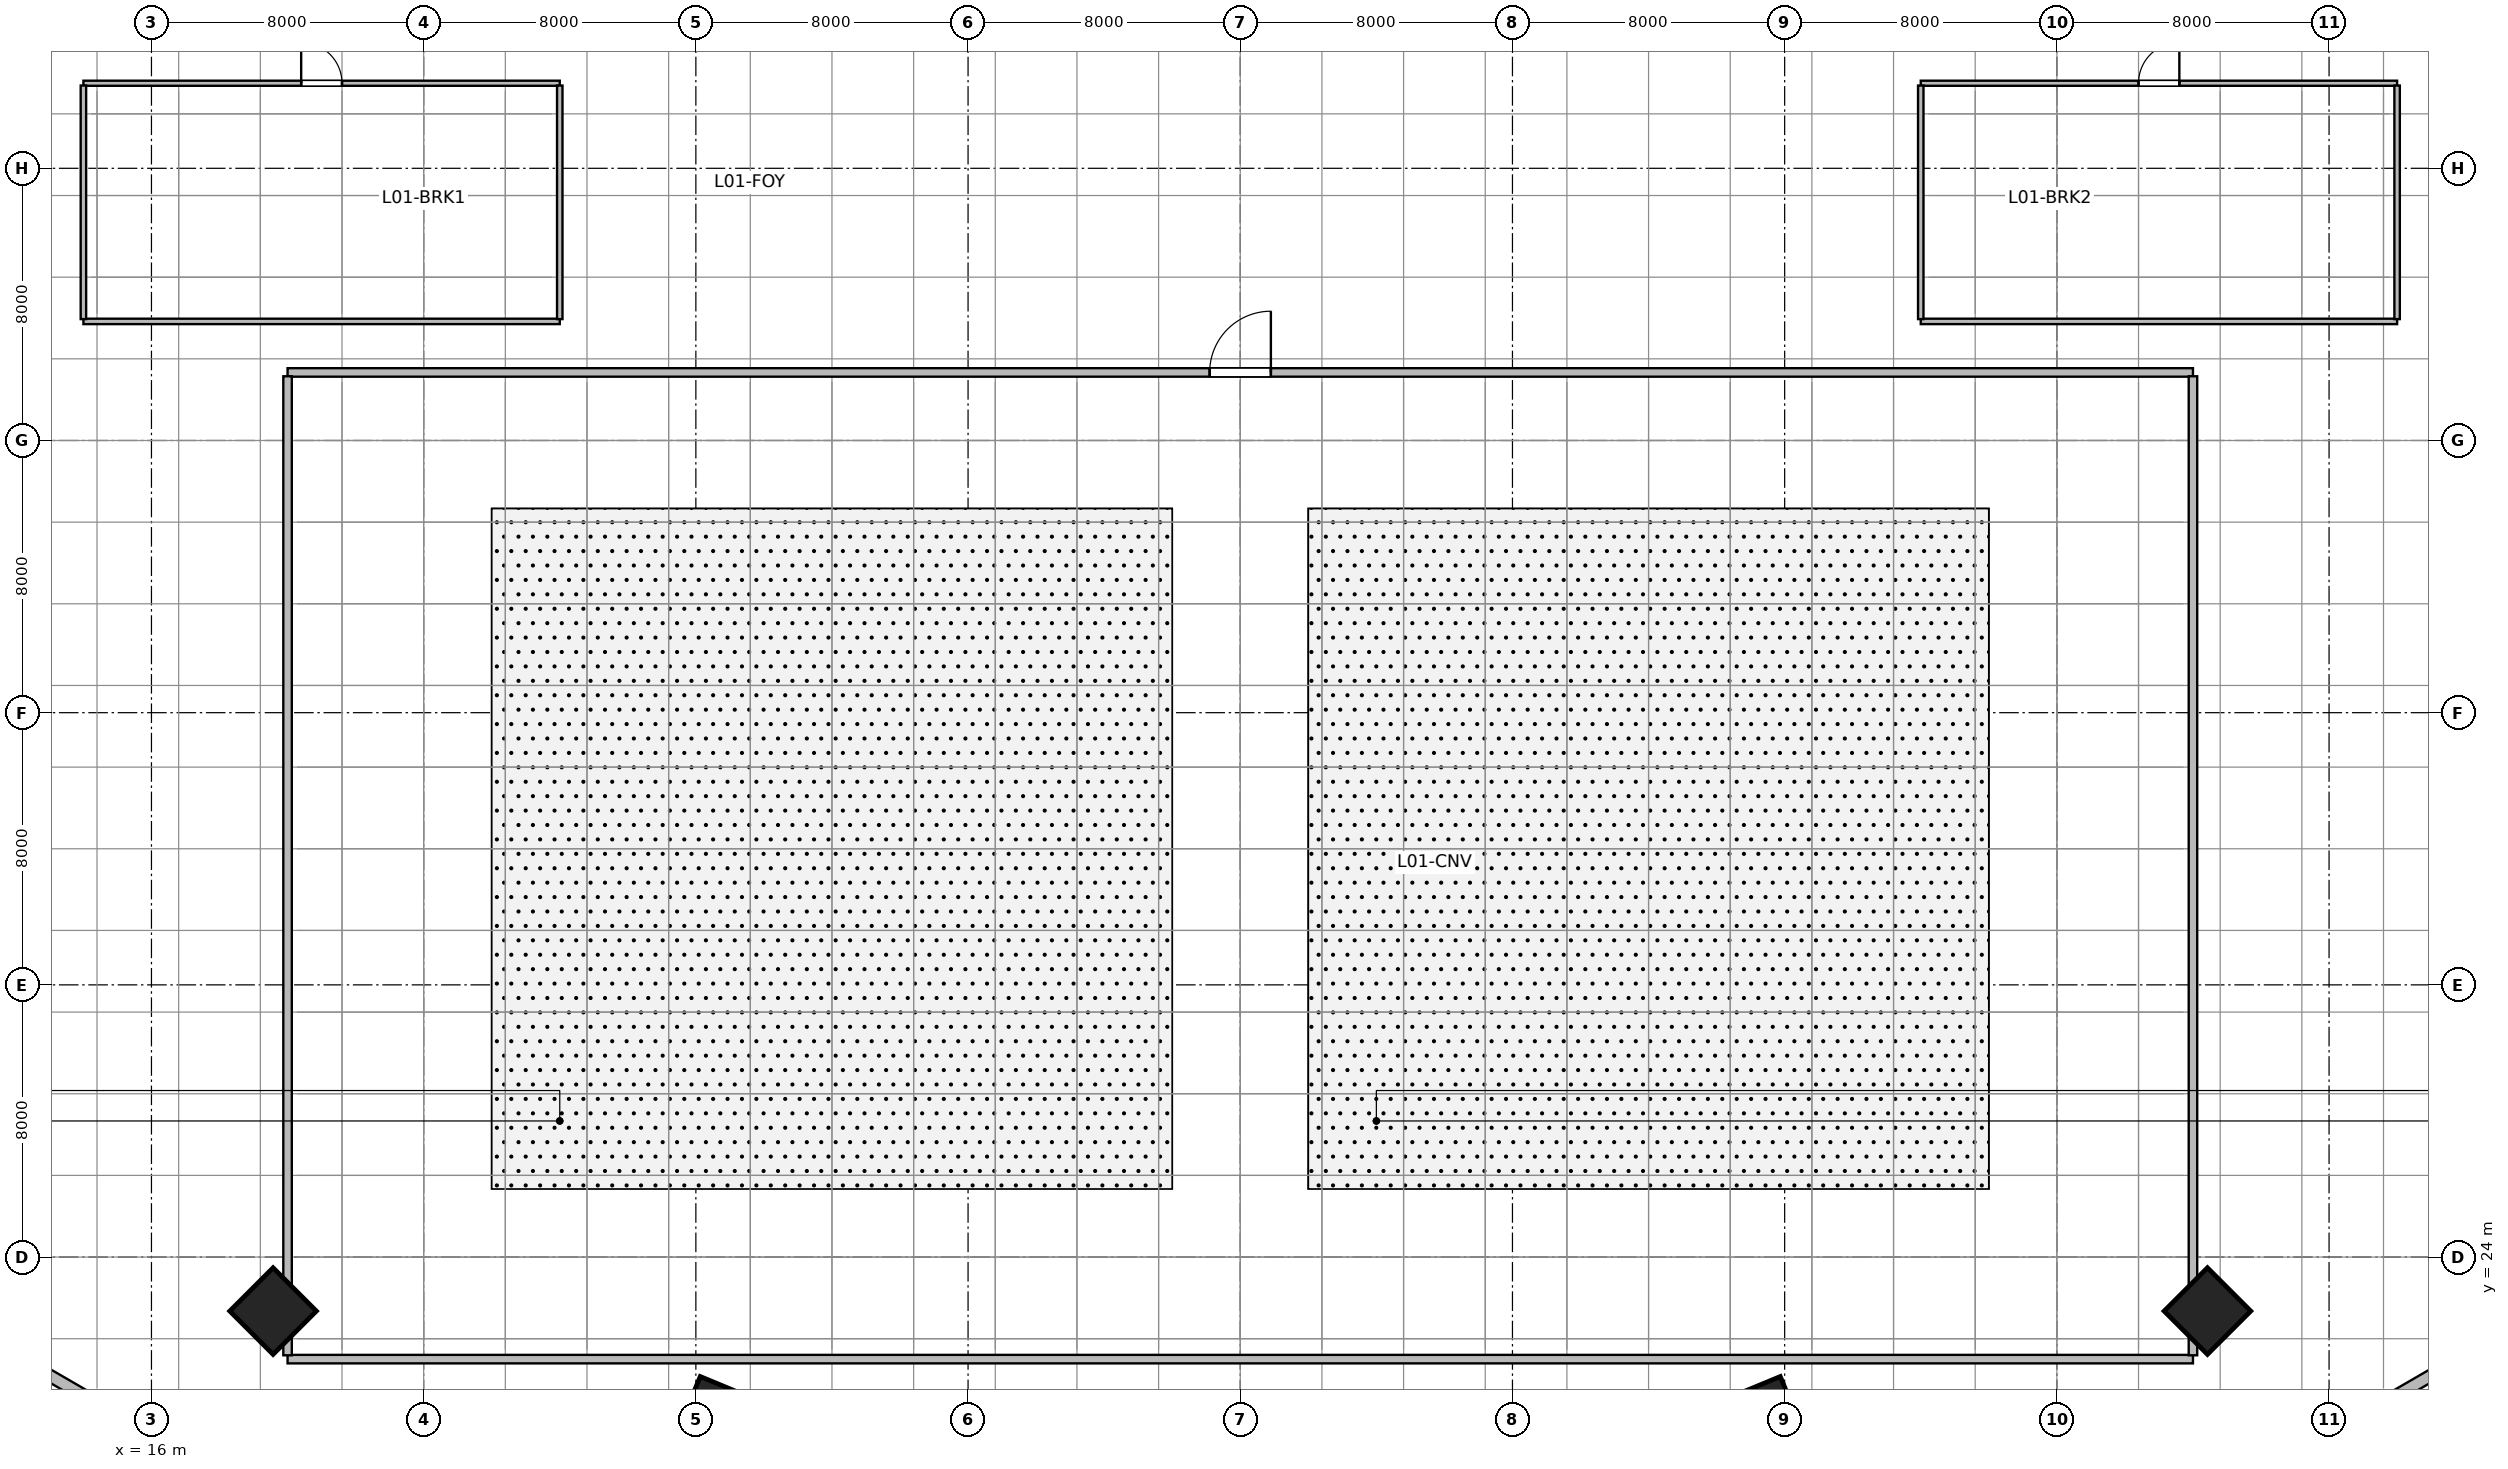
"""IFC4 building model, lengths in metres.
Left out: names, types, materials, properties, quantities, classifications, styles, units other than length and angle.
Written with IfcOpenShell. Run it as: python <this file> out.ifc"""

import sys

from ifc_helpers import new_model, si_unit, direction, frame, frame_2d, origin, origin_2d, place, context, subcontext, project, spatial, rectangle, extrude, source, transform, mapped, element, fill, save


model = new_model("IFC4")
c1 = context("Model", 3, precision=1e-05, world=origin(), true_north=direction((0.0, 1.0)))
c2 = subcontext(c1, "Body", "Model", "MODEL_VIEW")
j1 = project(units=[si_unit("LENGTHUNIT", "METRE"), si_unit("PLANEANGLEUNIT", "RADIAN")], contexts=[c1])
p1 = place(None, origin())
s1 = spatial("IfcSite", under=j1, at=p1, CompositionType="ELEMENT")
p2 = place(p1, origin())
s2 = spatial("IfcBuilding", under=s1, at=p2, CompositionType="ELEMENT")
p3 = place(p2, frame((0.0, 0.0, 6.0)))
s3 = spatial("IfcBuildingStorey", under=s2, at=p3, CompositionType="ELEMENT", Elevation=6.0)
m1 = source(origin(), c2, "Body", "SweptSolid", [
    extrude(rectangle(XDim=1.8, YDim=1.8, at=origin_2d()), origin(), (0.0, 0.0, 1.0), 6.0),
])
for number, where, z_axis, x_axis in (
    (1, (19.574, 22.412, 0.0), (0.0, 0.0, 1.0), (-0.707, -0.707, 0.0)),
    (2, (32.616, 19.312, 0.0), (0.0, 0.0, 1.0), (-0.383, -0.924, 0.0)),
    (3, (63.384, 19.312, 0.0), (0.0, 0.0, 1.0), (0.383, -0.924, 0.0)),
    (4, (76.426, 22.412, 0.0), (0.0, 0.0, 1.0), (0.707, -0.707, 0.0)),
):
    element("IfcColumn", number, at=place(p3, frame(where, z_axis=z_axis, x_axis=x_axis)), inside=s3, PredefinedType="COLUMN", context=c2, shape_type="MappedRepresentation", body=[
        mapped(m1, transform((0.0, 0.0, 0.0), scale=1.0)),
    ])
m2 = source(origin(), c2, "Body", "SweptSolid", [
    extrude(rectangle(XDim=4.535, YDim=0.35, at=frame_2d((2.268, 0.0))), origin(), (0.0, 0.0, 1.0), 5.7),
])
for number, where, z_axis, x_axis in (
    (5, (11.902, 21.154, 0.0), (0.0, 0.0, 1.0), (0.865, -0.501, 0.0)),
    (6, (80.173, 18.881, 0.0), (0.0, 0.0, 1.0), (0.865, 0.501, 0.0)),
):
    element("IfcWall", number, at=place(p3, frame(where, z_axis=z_axis, x_axis=x_axis)), inside=s3, PredefinedType="SOLIDWALL", context=c2, shape_type="MappedRepresentation", body=[
        mapped(m2, transform((0.0, 0.0, 0.0), scale=1.0)),
    ])
m3 = source(origin(), c2, "Body", "SweptSolid", [
    extrude(rectangle(XDim=56.0, YDim=0.25, at=frame_2d((28.0, 0.0))), origin(), (0.0, 0.0, 1.0), 4.761),
])
p4 = place(p3, frame((20.0, 21.0, 0.0), z_axis=(0.0, 0.0, 1.0), x_axis=(1.0, 0.0, 0.0)))
e7 = element("IfcWall", 7, at=p4, inside=s3, PredefinedType="PARTITIONING", context=c2, shape_type="MappedRepresentation", body=[
    mapped(m3, transform((0.0, 0.0, 0.0), scale=1.0)),
])
m4 = source(origin(), c2, "Body", "SweptSolid", [
    extrude(rectangle(XDim=56.0, YDim=0.25, at=frame_2d((28.0, 0.0))), origin(), (0.0, 0.0, 1.0), 5.7),
])
p5 = place(p3, frame((20.0, 50.0, 0.0), z_axis=(0.0, 0.0, 1.0), x_axis=(1.0, 0.0, 0.0)))
e8 = element("IfcWall", 8, at=p5, inside=s3, PredefinedType="PARTITIONING", context=c2, shape_type="MappedRepresentation", body=[
    mapped(m4, transform((0.0, 0.0, 0.0), scale=1.0)),
])
p6 = place(p5, frame((27.1, 0.0, 0.0)))
e9 = element("IfcOpeningElement", 9, at=p6, cuts=e8, PredefinedType="OPENING", context=c2, shape_type="SweptSolid", body=[
    extrude(rectangle(XDim=1.8, YDim=2.15, at=frame_2d((0.9, 1.075))), frame((0.0, 0.135, 0.0), z_axis=(0.0, -1.0, 0.0), x_axis=(1.0, 0.0, 0.0)), (0.0, 0.0, 1.0), 0.27),
])
m5 = source(origin(), c2, "Body", "SweptSolid", [
    extrude(rectangle(XDim=28.775, YDim=0.25, at=frame_2d((14.387, 0.0))), origin(), (0.0, 0.0, 1.0), 4.834),
])
for number, where, z_axis, x_axis in (
    (10, (20.0, 21.113, 0.0), (0.0, 0.0, 1.0), (0.0, 1.0, 0.0)),
    (11, (76.0, 21.113, 0.0), (0.0, 0.0, 1.0), (0.0, 1.0, 0.0)),
):
    element("IfcWall", number, at=place(p3, frame(where, z_axis=z_axis, x_axis=x_axis)), inside=s3, PredefinedType="PARTITIONING", context=c2, shape_type="MappedRepresentation", body=[
        mapped(m5, transform((0.0, 0.0, 0.0), scale=1.0)),
    ])
m6 = source(origin(), c2, "Body", "SweptSolid", [
    extrude(rectangle(XDim=14.0, YDim=0.16, at=frame_2d((7.0, 0.0))), origin(), (0.0, 0.0, 1.0), 5.7),
])
p7 = place(p3, frame((14.0, 51.5, 0.0), z_axis=(0.0, 0.0, 1.0), x_axis=(1.0, 0.0, 0.0)))
e12 = element("IfcWall", 12, at=p7, inside=s3, PredefinedType="MOVABLE", context=c2, shape_type="MappedRepresentation", body=[
    mapped(m6, transform((0.0, 0.0, 0.0), scale=1.0)),
])
m7 = source(origin(), c2, "Body", "SweptSolid", [
    extrude(rectangle(XDim=14.0, YDim=0.15, at=frame_2d((7.0, 0.0))), origin(), (0.0, 0.0, 1.0), 5.7),
])
p8 = place(p3, frame((14.0, 58.5, 0.0), z_axis=(0.0, 0.0, 1.0), x_axis=(1.0, 0.0, 0.0)))
e13 = element("IfcWall", 13, at=p8, inside=s3, PredefinedType="PARTITIONING", context=c2, shape_type="MappedRepresentation", body=[
    mapped(m7, transform((0.0, 0.0, 0.0), scale=1.0)),
])
p9 = place(p8, frame((6.4, 0.0, 0.0)))
e14 = element("IfcOpeningElement", 14, at=p9, cuts=e13, PredefinedType="OPENING", context=c2, shape_type="SweptSolid", body=[
    extrude(rectangle(XDim=1.2, YDim=2.15, at=frame_2d((0.6, 1.075))), frame((0.0, 0.085, 0.0), z_axis=(0.0, -1.0, 0.0), x_axis=(1.0, 0.0, 0.0)), (0.0, 0.0, 1.0), 0.17),
])
m8 = source(origin(), c2, "Body", "SweptSolid", [
    extrude(rectangle(XDim=6.865, YDim=0.16, at=frame_2d((3.433, 0.0))), origin(), (0.0, 0.0, 1.0), 5.7),
])
for number, where, z_axis, x_axis in (
    (15, (14.0, 51.567, 0.0), (0.0, 0.0, 1.0), (0.0, 1.0, 0.0)),
    (16, (28.0, 51.567, 0.0), (0.0, 0.0, 1.0), (0.0, 1.0, 0.0)),
):
    element("IfcWall", number, at=place(p3, frame(where, z_axis=z_axis, x_axis=x_axis)), inside=s3, PredefinedType="MOVABLE", context=c2, shape_type="MappedRepresentation", body=[
        mapped(m8, transform((0.0, 0.0, 0.0), scale=1.0)),
    ])
p10 = place(p3, frame((68.0, 51.5, 0.0), z_axis=(0.0, 0.0, 1.0), x_axis=(1.0, 0.0, 0.0)))
e17 = element("IfcWall", 17, at=p10, inside=s3, PredefinedType="MOVABLE", context=c2, shape_type="MappedRepresentation", body=[
    mapped(m6, transform((0.0, 0.0, 0.0), scale=1.0)),
])
p11 = place(p3, frame((68.0, 58.5, 0.0), z_axis=(0.0, 0.0, 1.0), x_axis=(1.0, 0.0, 0.0)))
e18 = element("IfcWall", 18, at=p11, inside=s3, PredefinedType="PARTITIONING", context=c2, shape_type="MappedRepresentation", body=[
    mapped(m7, transform((0.0, 0.0, 0.0), scale=1.0)),
])
p12 = place(p11, frame((6.4, 0.0, 0.0)))
e19 = element("IfcOpeningElement", 19, at=p12, cuts=e18, PredefinedType="OPENING", context=c2, shape_type="SweptSolid", body=[
    extrude(rectangle(XDim=1.2, YDim=2.15, at=frame_2d((0.6, 1.075))), frame((0.0, 0.085, 0.0), z_axis=(0.0, -1.0, 0.0), x_axis=(1.0, 0.0, 0.0)), (0.0, 0.0, 1.0), 0.17),
])
for number, where, z_axis, x_axis in (
    (20, (68.0, 51.567, 0.0), (0.0, 0.0, 1.0), (0.0, 1.0, 0.0)),
    (21, (82.0, 51.567, 0.0), (0.0, 0.0, 1.0), (0.0, 1.0, 0.0)),
):
    element("IfcWall", number, at=place(p3, frame(where, z_axis=z_axis, x_axis=x_axis)), inside=s3, PredefinedType="MOVABLE", context=c2, shape_type="MappedRepresentation", body=[
        mapped(m8, transform((0.0, 0.0, 0.0), scale=1.0)),
    ])
m9 = source(origin(), c2, "Body", "SweptSolid", [
    extrude(rectangle(XDim=1.8, YDim=2.15, at=frame_2d((0.9, 1.075))), frame((0.0, 0.025, 0.0), z_axis=(0.0, -1.0, 0.0), x_axis=(1.0, 0.0, 0.0)), (0.0, 0.0, 1.0), 0.05),
])
p13 = place(p6, origin())
e22 = element("IfcDoor", 22, at=p13, inside=s3, OperationType="SINGLE_SWING_RIGHT", PredefinedType="DOOR", context=c2, shape_type="MappedRepresentation", body=[
    mapped(m9, transform((0.0, 0.0, 0.0), scale=1.0)),
])
fill(e9, e22)
m10 = source(origin(), c2, "Body", "SweptSolid", [
    extrude(rectangle(XDim=1.2, YDim=2.15, at=frame_2d((0.6, 1.075))), frame((0.0, 0.025, 0.0), z_axis=(0.0, -1.0, 0.0), x_axis=(1.0, 0.0, 0.0)), (0.0, 0.0, 1.0), 0.05),
])
p14 = place(p9, origin())
e23 = element("IfcDoor", 23, at=p14, inside=s3, OperationType="SINGLE_SWING_LEFT", PredefinedType="DOOR", context=c2, shape_type="MappedRepresentation", body=[
    mapped(m10, transform((0.0, 0.0, 0.0), scale=1.0)),
])
fill(e14, e23)
p15 = place(p12, origin())
e24 = element("IfcDoor", 24, at=p15, inside=s3, OperationType="SINGLE_SWING_RIGHT", PredefinedType="DOOR", context=c2, shape_type="MappedRepresentation", body=[
    mapped(m10, transform((0.0, 0.0, 0.0), scale=1.0)),
])
fill(e19, e24)
save(model, sys.argv[1])
